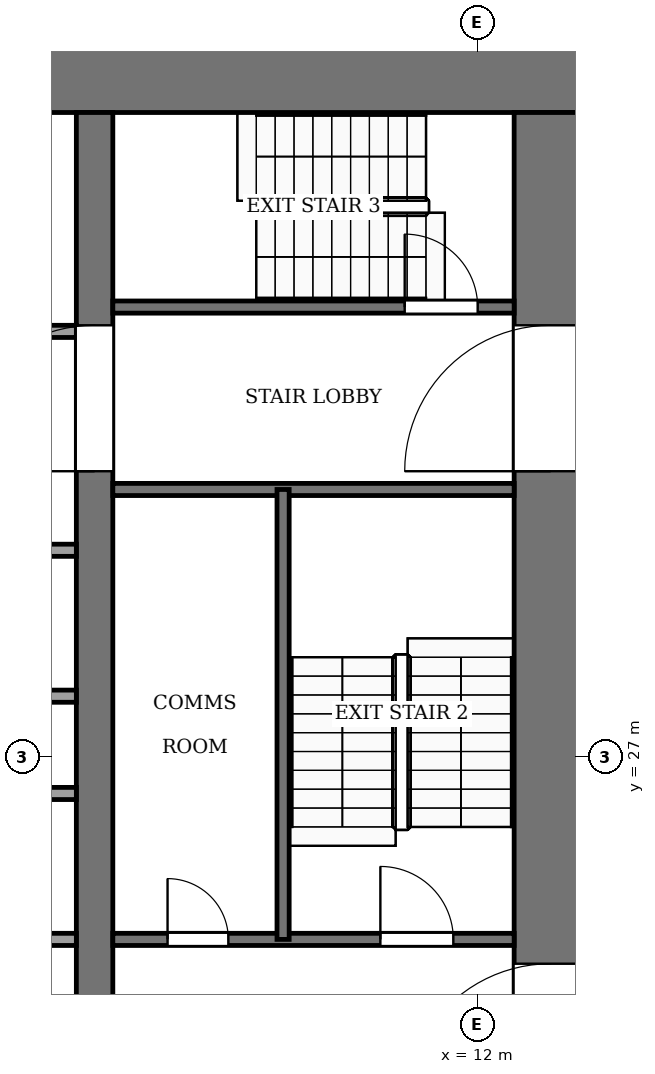
"""IFC4 building model, lengths in metres.
Left out: names, types, materials, properties, quantities, classifications, styles, units other than length and angle.
Written with IfcOpenShell. Run it as: python <this file> out.ifc"""

import sys

from ifc_helpers import new_model, si_unit, direction, frame, frame_2d, origin, place, context, subcontext, project, spatial, rectangle, extrude, element, fill, save


model = new_model("IFC4")
c1 = context("Model", 3, precision=1e-05, world=origin(), true_north=direction((0.0, 1.0)))
c2 = subcontext(c1, "Body", "Model", "MODEL_VIEW")
j1 = project(units=[si_unit("LENGTHUNIT", "METRE"), si_unit("PLANEANGLEUNIT", "RADIAN")], contexts=[c1])
p1 = place(None, origin())
s1 = spatial("IfcSite", under=j1, at=p1, CompositionType="ELEMENT")
p2 = place(p1, origin())
s2 = spatial("IfcBuilding", under=s1, at=p2, CompositionType="ELEMENT")
p3 = place(p2, frame((0.0, 0.0, 114.0)))
s3 = spatial("IfcBuildingStorey", under=s2, at=p3, CompositionType="ELEMENT", Elevation=114.0)
p4 = place(p3, frame((-13.8, 38.2, -0.25), z_axis=(0.0, 0.0, 1.0), x_axis=(1.0, 0.0, 0.0)))
e1 = element("IfcWall", 1, at=p4, inside=s3, PredefinedType="SHEAR", context=c2, shape_type="SweptSolid", body=[
    extrude(rectangle(XDim=27.6, YDim=1.2, at=frame_2d((13.8, 0.0))), origin(), (0.0, 0.0, 1.0), 7.12),
])
p5 = place(p3, frame((13.2, 18.4, -0.25), z_axis=(0.0, 0.0, 1.0), x_axis=(0.0, 1.0, 0.0)))
e2 = element("IfcWall", 2, at=p5, inside=s3, PredefinedType="SHEAR", context=c2, shape_type="SweptSolid", body=[
    extrude(rectangle(XDim=19.2, YDim=1.2, at=frame_2d((9.6, 0.0))), origin(), (0.0, 0.0, 1.0), 7.12),
])
p6 = place(p5, frame((2.8, 0.0, 0.25)))
e3 = element("IfcOpeningElement", 3, at=p6, cuts=e2, PredefinedType="OPENING", context=c2, shape_type="SweptSolid", body=[
    extrude(rectangle(XDim=2.4, YDim=2.4, at=frame_2d((1.2, 1.2))), frame((0.0, 0.61, 0.0), z_axis=(0.0, -1.0, 0.0), x_axis=(1.0, 0.0, 0.0)), (0.0, 0.0, 1.0), 1.22),
])
p7 = place(p5, frame((13.3, 0.0, 0.25)))
e4 = element("IfcOpeningElement", 4, at=p7, cuts=e2, PredefinedType="OPENING", context=c2, shape_type="SweptSolid", body=[
    extrude(rectangle(XDim=2.4, YDim=2.4, at=frame_2d((1.2, 1.2))), frame((0.0, 0.61, 0.0), z_axis=(0.0, -1.0, 0.0), x_axis=(1.0, 0.0, 0.0)), (0.0, 0.0, 1.0), 1.22),
])
p8 = place(p3, frame((5.7, 18.4, -0.25), z_axis=(0.0, 0.0, 1.0), x_axis=(0.0, 1.0, 0.0)))
e5 = element("IfcWall", 5, at=p8, inside=s3, PredefinedType="SHEAR", context=c2, shape_type="SweptSolid", body=[
    extrude(rectangle(XDim=19.2, YDim=0.6, at=frame_2d((9.6, 0.0))), origin(), (0.0, 0.0, 1.0), 7.12),
])
p9 = place(p8, frame((13.3, 0.0, 0.25)))
e6 = element("IfcOpeningElement", 6, at=p9, cuts=e5, PredefinedType="OPENING", context=c2, shape_type="SweptSolid", body=[
    extrude(rectangle(XDim=2.4, YDim=2.4, at=frame_2d((1.2, 1.2))), frame((0.0, 0.31, 0.0), z_axis=(0.0, -1.0, 0.0), x_axis=(1.0, 0.0, 0.0)), (0.0, 0.0, 1.0), 0.62),
])
p10 = place(p3, frame((-5.4, 24.0, 0.0), z_axis=(0.0, 0.0, 1.0), x_axis=(1.0, 0.0, 0.0)))
e7 = element("IfcWall", 7, at=p10, inside=s3, PredefinedType="PARTITIONING", context=c2, shape_type="SweptSolid", body=[
    extrude(rectangle(XDim=10.8, YDim=0.2, at=frame_2d((5.4, 0.0))), origin(), (0.0, 0.0, 1.0), 6.87),
])
p11 = place(p3, frame((6.0, 24.0, 0.0), z_axis=(0.0, 0.0, 1.0), x_axis=(1.0, 0.0, 0.0)))
e8 = element("IfcWall", 8, at=p11, inside=s3, PredefinedType="PARTITIONING", context=c2, shape_type="SweptSolid", body=[
    extrude(rectangle(XDim=6.6, YDim=0.2, at=frame_2d((3.3, 0.0))), origin(), (0.0, 0.0, 1.0), 6.87),
])
p12 = place(p11, frame((0.9, 0.0, 0.0)))
e9 = element("IfcOpeningElement", 9, at=p12, cuts=e8, PredefinedType="OPENING", context=c2, shape_type="SweptSolid", body=[
    extrude(rectangle(XDim=1.0, YDim=2.1, at=frame_2d((0.5, 1.05))), frame((0.0, 0.11, 0.0), z_axis=(0.0, -1.0, 0.0), x_axis=(1.0, 0.0, 0.0)), (0.0, 0.0, 1.0), 0.22),
])
p13 = place(p11, frame((4.4, 0.0, 0.0)))
e10 = element("IfcOpeningElement", 10, at=p13, cuts=e8, PredefinedType="OPENING", context=c2, shape_type="SweptSolid", body=[
    extrude(rectangle(XDim=1.2, YDim=2.2, at=frame_2d((0.6, 1.1))), frame((0.0, 0.11, 0.0), z_axis=(0.0, -1.0, 0.0), x_axis=(1.0, 0.0, 0.0)), (0.0, 0.0, 1.0), 0.22),
])
for number, where, z_axis, x_axis in (
    (11, (-5.4, 26.4, 0.0), (0.0, 0.0, 1.0), (1.0, 0.0, 0.0)),
    (12, (-5.4, 28.0, 0.0), (0.0, 0.0, 1.0), (1.0, 0.0, 0.0)),
    (13, (-5.4, 30.4, 0.0), (0.0, 0.0, 1.0), (1.0, 0.0, 0.0)),
):
    element("IfcWall", number, at=place(p3, frame(where, z_axis=z_axis, x_axis=x_axis)), inside=s3, PredefinedType="PARTITIONING", context=c2, shape_type="SweptSolid", body=[
        extrude(rectangle(XDim=10.8, YDim=0.2, at=frame_2d((5.4, 0.0))), origin(), (0.0, 0.0, 1.0), 6.87),
    ])
p14 = place(p3, frame((6.0, 31.4, 0.0), z_axis=(0.0, 0.0, 1.0), x_axis=(1.0, 0.0, 0.0)))
e14 = element("IfcWall", 14, at=p14, inside=s3, PredefinedType="PARTITIONING", context=c2, shape_type="SweptSolid", body=[
    extrude(rectangle(XDim=6.6, YDim=0.2, at=frame_2d((3.3, 0.0))), origin(), (0.0, 0.0, 1.0), 6.87),
])
p15 = place(p3, frame((-5.4, 34.0, 0.0), z_axis=(0.0, 0.0, 1.0), x_axis=(1.0, 0.0, 0.0)))
e15 = element("IfcWall", 15, at=p15, inside=s3, PredefinedType="PARTITIONING", context=c2, shape_type="SweptSolid", body=[
    extrude(rectangle(XDim=10.8, YDim=0.2, at=frame_2d((5.4, 0.0))), origin(), (0.0, 0.0, 1.0), 6.87),
])
p16 = place(p15, frame((6.15, 0.0, 0.0)))
e16 = element("IfcOpeningElement", 16, at=p16, cuts=e15, PredefinedType="OPENING", context=c2, shape_type="SweptSolid", body=[
    extrude(rectangle(XDim=1.2, YDim=2.2, at=frame_2d((0.6, 1.1))), frame((0.0, 0.11, 0.0), z_axis=(0.0, -1.0, 0.0), x_axis=(1.0, 0.0, 0.0)), (0.0, 0.0, 1.0), 0.22),
])
p17 = place(p15, frame((8.95, 0.0, 0.0)))
e17 = element("IfcOpeningElement", 17, at=p17, cuts=e15, PredefinedType="OPENING", context=c2, shape_type="SweptSolid", body=[
    extrude(rectangle(XDim=1.0, YDim=2.1, at=frame_2d((0.5, 1.05))), frame((0.0, 0.11, 0.0), z_axis=(0.0, -1.0, 0.0), x_axis=(1.0, 0.0, 0.0)), (0.0, 0.0, 1.0), 0.22),
])
p18 = place(p3, frame((6.0, 34.4, 0.0), z_axis=(0.0, 0.0, 1.0), x_axis=(1.0, 0.0, 0.0)))
e18 = element("IfcWall", 18, at=p18, inside=s3, PredefinedType="PARTITIONING", context=c2, shape_type="SweptSolid", body=[
    extrude(rectangle(XDim=6.6, YDim=0.2, at=frame_2d((3.3, 0.0))), origin(), (0.0, 0.0, 1.0), 6.87),
])
p19 = place(p18, frame((4.8, 0.0, 0.0)))
e19 = element("IfcOpeningElement", 19, at=p19, cuts=e18, PredefinedType="OPENING", context=c2, shape_type="SweptSolid", body=[
    extrude(rectangle(XDim=1.2, YDim=2.2, at=frame_2d((0.6, 1.1))), frame((0.0, 0.11, 0.0), z_axis=(0.0, -1.0, 0.0), x_axis=(1.0, 0.0, 0.0)), (0.0, 0.0, 1.0), 0.22),
])
p20 = place(p3, frame((8.8, 24.0, 0.0), z_axis=(0.0, 0.0, 1.0), x_axis=(0.0, 1.0, 0.0)))
e20 = element("IfcWall", 20, at=p20, inside=s3, PredefinedType="PARTITIONING", context=c2, shape_type="SweptSolid", body=[
    extrude(rectangle(XDim=7.4, YDim=0.2, at=frame_2d((3.7, 0.0))), origin(), (0.0, 0.0, 1.0), 6.87),
])
p21 = place(p12, origin())
e21 = element("IfcDoor", 21, at=p21, inside=s3, OperationType="SINGLE_SWING_LEFT", PredefinedType="DOOR", context=c2, shape_type="SweptSolid", body=[
    extrude(rectangle(XDim=1.0, YDim=2.1, at=frame_2d((0.5, 1.05))), frame((0.0, 0.025, 0.0), z_axis=(0.0, -1.0, 0.0), x_axis=(1.0, 0.0, 0.0)), (0.0, 0.0, 1.0), 0.05),
])
fill(e9, e21)
p22 = place(p13, origin())
e22 = element("IfcDoor", 22, at=p22, inside=s3, OperationType="SINGLE_SWING_LEFT", PredefinedType="DOOR", context=c2, shape_type="SweptSolid", body=[
    extrude(rectangle(XDim=1.2, YDim=2.2, at=frame_2d((0.6, 1.1))), frame((0.0, 0.025, 0.0), z_axis=(0.0, -1.0, 0.0), x_axis=(1.0, 0.0, 0.0)), (0.0, 0.0, 1.0), 0.05),
])
fill(e10, e22)
p23 = place(p19, origin())
e23 = element("IfcDoor", 23, at=p23, inside=s3, OperationType="SINGLE_SWING_RIGHT", PredefinedType="DOOR", context=c2, shape_type="SweptSolid", body=[
    extrude(rectangle(XDim=1.2, YDim=2.2, at=frame_2d((0.6, 1.1))), frame((0.0, 0.025, 0.0), z_axis=(0.0, -1.0, 0.0), x_axis=(1.0, 0.0, 0.0)), (0.0, 0.0, 1.0), 0.05),
])
fill(e19, e23)
p24 = place(p9, origin())
e24 = element("IfcDoor", 24, at=p24, inside=s3, OperationType="DOUBLE_DOOR_SINGLE_SWING", PredefinedType="DOOR", context=c2, shape_type="SweptSolid", body=[
    extrude(rectangle(XDim=2.4, YDim=2.4, at=frame_2d((1.2, 1.2))), frame((0.0, 0.025, 0.0), z_axis=(0.0, -1.0, 0.0), x_axis=(1.0, 0.0, 0.0)), (0.0, 0.0, 1.0), 0.05),
])
fill(e6, e24)
p25 = place(p6, origin())
e25 = element("IfcDoor", 25, at=p25, inside=s3, OperationType="DOUBLE_DOOR_SINGLE_SWING", PredefinedType="DOOR", context=c2, shape_type="SweptSolid", body=[
    extrude(rectangle(XDim=2.4, YDim=2.4, at=frame_2d((1.2, 1.2))), frame((0.0, 0.025, 0.0), z_axis=(0.0, -1.0, 0.0), x_axis=(1.0, 0.0, 0.0)), (0.0, 0.0, 1.0), 0.05),
])
fill(e3, e25)
p26 = place(p7, origin())
e26 = element("IfcDoor", 26, at=p26, inside=s3, OperationType="DOUBLE_DOOR_SINGLE_SWING", PredefinedType="DOOR", context=c2, shape_type="SweptSolid", body=[
    extrude(rectangle(XDim=2.4, YDim=2.4, at=frame_2d((1.2, 1.2))), frame((0.0, 0.025, 0.0), z_axis=(0.0, -1.0, 0.0), x_axis=(1.0, 0.0, 0.0)), (0.0, 0.0, 1.0), 0.05),
])
fill(e4, e26)
save(model, sys.argv[1])
